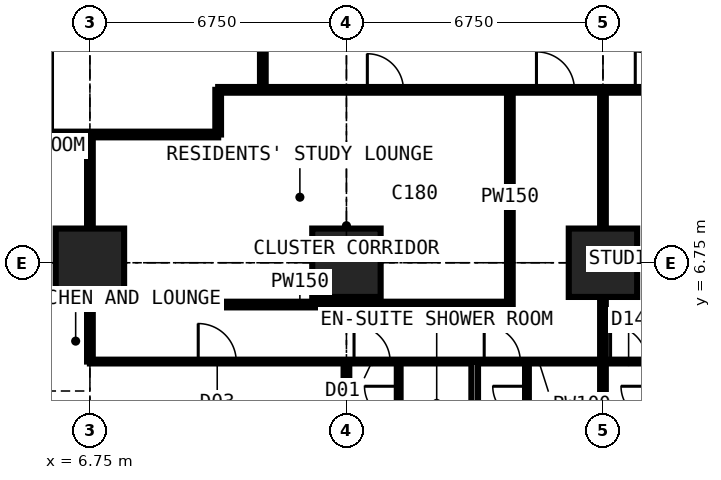
"""IFC4 building model, lengths in metres.
Left out: names, types, materials, properties, quantities, classifications, styles, units other than length and angle.
Written with IfcOpenShell. Run it as: python <this file> out.ifc"""

import sys

from ifc_helpers import new_model, si_unit, direction, frame, frame_2d, origin, origin_2d, place, context, subcontext, project, spatial, rectangle, extrude, element, fill, save


model = new_model("IFC4")
c1 = context("Model", 3, precision=1e-05, world=origin(), true_north=direction((0.0, 1.0)))
c2 = subcontext(c1, "Body", "Model", "MODEL_VIEW")
j1 = project(units=[si_unit("LENGTHUNIT", "METRE"), si_unit("PLANEANGLEUNIT", "RADIAN")], contexts=[c1])
p1 = place(None, origin())
s1 = spatial("IfcSite", under=j1, at=p1, CompositionType="ELEMENT")
p2 = place(p1, origin())
s2 = spatial("IfcBuilding", under=s1, at=p2, CompositionType="ELEMENT")
p3 = place(p2, frame((0.0, 0.0, 90.9)))
s3 = spatial("IfcBuildingStorey", under=s2, at=p3, CompositionType="ELEMENT", Elevation=90.9)
for number, where, z_axis, x_axis in (
    (1, (6.75, 6.75, 0.0), (0.0, 0.0, 1.0), (1.0, 0.0, 0.0)),
    (2, (13.5, 6.75, 0.0), (0.0, 0.0, 1.0), (1.0, 0.0, 0.0)),
    (3, (20.25, 6.75, 0.0), (0.0, 0.0, 1.0), (1.0, 0.0, 0.0)),
):
    element("IfcColumn", number, at=place(p3, frame(where, z_axis=z_axis, x_axis=x_axis)), inside=s3, PredefinedType="COLUMN", context=c2, shape_type="SweptSolid", body=[
        extrude(rectangle(XDim=1.8, YDim=1.8, at=origin_2d()), origin(), (0.0, 0.0, 1.0), 3.6),
    ])
p4 = place(p3, frame((-0.734, 10.125, 0.0), z_axis=(0.0, 0.0, 1.0), x_axis=(1.0, 0.0, 0.0)))
e4 = element("IfcWall", 4, at=p4, inside=s3, PredefinedType="PARTITIONING", context=c2, shape_type="SweptSolid", body=[
    extrude(rectangle(XDim=10.859, YDim=0.15, at=frame_2d((5.429, 0.0))), origin(), (0.0, 0.0, 1.0), 3.375),
])
p5 = place(p3, frame((6.75, 4.15, 0.0), z_axis=(0.0, 0.0, 1.0), x_axis=(0.0, 1.0, 0.0)))
e5 = element("IfcWall", 5, at=p5, inside=s3, PredefinedType="PARTITIONING", context=c2, shape_type="SweptSolid", body=[
    extrude(rectangle(XDim=5.975, YDim=0.15, at=frame_2d((2.988, 0.0))), origin(), (0.0, 0.0, 1.0), 2.877),
])
p6 = place(p3, frame((6.75, 4.15, 0.0), z_axis=(0.0, 0.0, 1.0), x_axis=(1.0, 0.0, 0.0)))
e6 = element("IfcWall", 6, at=p6, inside=s3, PredefinedType="PARTITIONING", context=c2, shape_type="SweptSolid", body=[
    extrude(rectangle(XDim=23.625, YDim=0.1, at=frame_2d((11.812, 0.0))), origin(), (0.0, 0.0, 1.0), 3.375),
])
p7 = place(p6, frame((2.85, 0.0, 0.0)))
e7 = element("IfcOpeningElement", 7, at=p7, cuts=e6, PredefinedType="OPENING", context=c2, shape_type="SweptSolid", body=[
    extrude(rectangle(XDim=1.0, YDim=2.2, at=frame_2d((0.5, 1.1))), frame((0.0, 0.06, 0.0), z_axis=(0.0, -1.0, 0.0), x_axis=(1.0, 0.0, 0.0)), (0.0, 0.0, 1.0), 0.12),
])
p8 = place(p6, frame((6.95, 0.0, 0.0)))
e8 = element("IfcOpeningElement", 8, at=p8, cuts=e6, PredefinedType="OPENING", context=c2, shape_type="SweptSolid", body=[
    extrude(rectangle(XDim=0.95, YDim=2.2, at=frame_2d((0.475, 1.1))), frame((0.0, 0.06, 0.0), z_axis=(0.0, -1.0, 0.0), x_axis=(1.0, 0.0, 0.0)), (0.0, 0.0, 1.0), 0.12),
])
p9 = place(p6, frame((10.375, 0.0, 0.0)))
e9 = element("IfcOpeningElement", 9, at=p9, cuts=e6, PredefinedType="OPENING", context=c2, shape_type="SweptSolid", body=[
    extrude(rectangle(XDim=0.95, YDim=2.2, at=frame_2d((0.475, 1.1))), frame((0.0, 0.06, 0.0), z_axis=(0.0, -1.0, 0.0), x_axis=(1.0, 0.0, 0.0)), (0.0, 0.0, 1.0), 0.12),
])
p10 = place(p6, frame((13.7, 0.0, 0.0)))
e10 = element("IfcOpeningElement", 10, at=p10, cuts=e6, PredefinedType="OPENING", context=c2, shape_type="SweptSolid", body=[
    extrude(rectangle(XDim=0.95, YDim=2.2, at=frame_2d((0.475, 1.1))), frame((0.0, 0.06, 0.0), z_axis=(0.0, -1.0, 0.0), x_axis=(1.0, 0.0, 0.0)), (0.0, 0.0, 1.0), 0.12),
])
p11 = place(p6, frame((17.125, 0.0, 0.0)))
e11 = element("IfcOpeningElement", 11, at=p11, cuts=e6, PredefinedType="OPENING", context=c2, shape_type="SweptSolid", body=[
    extrude(rectangle(XDim=0.95, YDim=2.2, at=frame_2d((0.475, 1.1))), frame((0.0, 0.06, 0.0), z_axis=(0.0, -1.0, 0.0), x_axis=(1.0, 0.0, 0.0)), (0.0, 0.0, 1.0), 0.12),
])
p12 = place(p6, frame((20.5, 0.0, 0.0)))
e12 = element("IfcOpeningElement", 12, at=p12, cuts=e6, PredefinedType="OPENING", context=c2, shape_type="SweptSolid", body=[
    extrude(rectangle(XDim=0.95, YDim=2.2, at=frame_2d((0.475, 1.1))), frame((0.0, 0.06, 0.0), z_axis=(0.0, -1.0, 0.0), x_axis=(1.0, 0.0, 0.0)), (0.0, 0.0, 1.0), 0.12),
])
p13 = place(p3, frame((6.75, 5.65, 0.0), z_axis=(0.0, 0.0, 1.0), x_axis=(1.0, 0.0, 0.0)))
e13 = element("IfcWall", 13, at=p13, inside=s3, PredefinedType="PARTITIONING", context=c2, shape_type="SweptSolid", body=[
    extrude(rectangle(XDim=11.05, YDim=0.15, at=frame_2d((5.525, 0.0))), origin(), (0.0, 0.0, 1.0), 3.375),
])
p14 = place(p3, frame((10.125, 10.125, 0.0), z_axis=(0.0, 0.0, 1.0), x_axis=(0.0, 1.0, 0.0)))
e14 = element("IfcWall", 14, at=p14, inside=s3, PredefinedType="PARTITIONING", context=c2, shape_type="SweptSolid", body=[
    extrude(rectangle(XDim=1.175, YDim=0.15, at=frame_2d((0.587, 0.0))), origin(), (0.0, 0.0, 1.0), 3.375),
])
p15 = place(p3, frame((10.125, 11.3, 0.0), z_axis=(0.0, 0.0, 1.0), x_axis=(1.0, 0.0, 0.0)))
e15 = element("IfcWall", 15, at=p15, inside=s3, PredefinedType="PARTITIONING", context=c2, shape_type="SweptSolid", body=[
    extrude(rectangle(XDim=20.675, YDim=0.15, at=frame_2d((10.337, 0.0))), origin(), (0.0, 0.0, 1.0), 3.375),
])
p16 = place(p15, frame((8.375, 0.0, 0.0)))
e16 = element("IfcOpeningElement", 16, at=p16, cuts=e15, PredefinedType="OPENING", context=c2, shape_type="SweptSolid", body=[
    extrude(rectangle(XDim=1.0, YDim=2.2, at=frame_2d((0.5, 1.1))), frame((0.0, 0.085, 0.0), z_axis=(0.0, -1.0, 0.0), x_axis=(1.0, 0.0, 0.0)), (0.0, 0.0, 1.0), 0.17),
])
p17 = place(p15, frame((10.975, 0.0, 0.0)))
e17 = element("IfcOpeningElement", 17, at=p17, cuts=e15, PredefinedType="OPENING", context=c2, shape_type="SweptSolid", body=[
    extrude(rectangle(XDim=1.0, YDim=2.2, at=frame_2d((0.5, 1.1))), frame((0.0, 0.085, 0.0), z_axis=(0.0, -1.0, 0.0), x_axis=(1.0, 0.0, 0.0)), (0.0, 0.0, 1.0), 0.17),
])
p18 = place(p15, frame((3.925, 0.0, 0.0)))
e18 = element("IfcOpeningElement", 18, at=p18, cuts=e15, PredefinedType="OPENING", context=c2, shape_type="SweptSolid", body=[
    extrude(rectangle(XDim=0.95, YDim=2.2, at=frame_2d((0.475, 1.1))), frame((0.0, 0.085, 0.0), z_axis=(0.0, -1.0, 0.0), x_axis=(1.0, 0.0, 0.0)), (0.0, 0.0, 1.0), 0.17),
])
p19 = place(p3, frame((11.3, 11.3, 0.0), z_axis=(0.0, 0.0, 1.0), x_axis=(0.0, 1.0, 0.0)))
e19 = element("IfcWall", 19, at=p19, inside=s3, PredefinedType="PARTITIONING", context=c2, shape_type="SweptSolid", body=[
    extrude(rectangle(XDim=19.3, YDim=0.15, at=frame_2d((9.65, 0.0))), origin(), (0.0, 0.0, 1.0), 3.375),
])
p20 = place(p19, frame((18.1, 0.0, 0.0)))
e20 = element("IfcOpeningElement", 20, at=p20, cuts=e19, PredefinedType="OPENING", context=c2, shape_type="SweptSolid", body=[
    extrude(rectangle(XDim=1.0, YDim=2.2, at=frame_2d((0.5, 1.1))), frame((0.0, 0.085, 0.0), z_axis=(0.0, -1.0, 0.0), x_axis=(1.0, 0.0, 0.0)), (0.0, 0.0, 1.0), 0.17),
])
p21 = place(p19, frame((10.137, 0.0, 0.0)))
e21 = element("IfcOpeningElement", 21, at=p21, cuts=e19, PredefinedType="OPENING", context=c2, shape_type="SweptSolid", body=[
    extrude(rectangle(XDim=1.0, YDim=2.2, at=frame_2d((0.5, 1.1))), frame((0.0, 0.085, 0.0), z_axis=(0.0, -1.0, 0.0), x_axis=(1.0, 0.0, 0.0)), (0.0, 0.0, 1.0), 0.17),
])
p22 = place(p3, frame((13.5, -0.734, 0.0), z_axis=(0.0, 0.0, 1.0), x_axis=(0.0, 1.0, 0.0)))
e22 = element("IfcWall", 22, at=p22, inside=s3, PredefinedType="PARTITIONING", context=c2, shape_type="SweptSolid", body=[
    extrude(rectangle(XDim=4.884, YDim=0.15, at=frame_2d((2.442, 0.0))), origin(), (0.0, 0.0, 1.0), 2.61),
])
p23 = place(p3, frame((14.875, 1.95, 0.0), z_axis=(0.0, 0.0, 1.0), x_axis=(0.0, 1.0, 0.0)))
e23 = element("IfcWall", 23, at=p23, inside=s3, PredefinedType="PARTITIONING", context=c2, shape_type="SweptSolid", body=[
    extrude(rectangle(XDim=2.2, YDim=0.1, at=frame_2d((1.1, 0.0))), origin(), (0.0, 0.0, 1.0), 3.375),
])
p24 = place(p23, frame((0.65, 0.0, 0.0)))
e24 = element("IfcOpeningElement", 24, at=p24, cuts=e23, PredefinedType="OPENING", context=c2, shape_type="SweptSolid", body=[
    extrude(rectangle(XDim=0.9, YDim=2.2, at=frame_2d((0.45, 1.1))), frame((0.0, 0.06, 0.0), z_axis=(0.0, -1.0, 0.0), x_axis=(1.0, 0.0, 0.0)), (0.0, 0.0, 1.0), 0.12),
])
p25 = place(p3, frame((16.875, -0.734, 0.0), z_axis=(0.0, 0.0, 1.0), x_axis=(0.0, 1.0, 0.0)))
e25 = element("IfcWall", 25, at=p25, inside=s3, PredefinedType="PARTITIONING", context=c2, shape_type="SweptSolid", body=[
    extrude(rectangle(XDim=4.884, YDim=0.175, at=frame_2d((2.442, 0.0))), origin(), (0.0, 0.0, 1.0), 3.375),
])
p26 = place(p3, frame((17.8, 5.65, 0.0), z_axis=(0.0, 0.0, 1.0), x_axis=(0.0, 1.0, 0.0)))
e26 = element("IfcWall", 26, at=p26, inside=s3, PredefinedType="PARTITIONING", context=c2, shape_type="SweptSolid", body=[
    extrude(rectangle(XDim=5.65, YDim=0.15, at=frame_2d((2.825, 0.0))), origin(), (0.0, 0.0, 1.0), 3.375),
])
p27 = place(p3, frame((18.25, 1.95, 0.0), z_axis=(0.0, 0.0, 1.0), x_axis=(0.0, 1.0, 0.0)))
e27 = element("IfcWall", 27, at=p27, inside=s3, PredefinedType="PARTITIONING", context=c2, shape_type="SweptSolid", body=[
    extrude(rectangle(XDim=2.2, YDim=0.1, at=frame_2d((1.1, 0.0))), origin(), (0.0, 0.0, 1.0), 3.375),
])
p28 = place(p27, frame((0.65, 0.0, 0.0)))
e28 = element("IfcOpeningElement", 28, at=p28, cuts=e27, PredefinedType="OPENING", context=c2, shape_type="SweptSolid", body=[
    extrude(rectangle(XDim=0.9, YDim=2.2, at=frame_2d((0.45, 1.1))), frame((0.0, 0.06, 0.0), z_axis=(0.0, -1.0, 0.0), x_axis=(1.0, 0.0, 0.0)), (0.0, 0.0, 1.0), 0.12),
])
p29 = place(p3, frame((20.25, -0.734, 0.0), z_axis=(0.0, 0.0, 1.0), x_axis=(0.0, 1.0, 0.0)))
e29 = element("IfcWall", 29, at=p29, inside=s3, PredefinedType="PARTITIONING", context=c2, shape_type="SweptSolid", body=[
    extrude(rectangle(XDim=12.034, YDim=0.15, at=frame_2d((6.017, 0.0))), origin(), (0.0, 0.0, 1.0), 2.61),
])
p30 = place(p7, origin())
e30 = element("IfcDoor", 30, at=p30, inside=s3, OperationType="SINGLE_SWING_LEFT", PredefinedType="DOOR", context=c2, shape_type="SweptSolid", body=[
    extrude(rectangle(XDim=1.0, YDim=2.2, at=frame_2d((0.5, 1.1))), frame((0.0, 0.025, 0.0), z_axis=(0.0, -1.0, 0.0), x_axis=(1.0, 0.0, 0.0)), (0.0, 0.0, 1.0), 0.05),
])
fill(e7, e30)
p31 = place(p8, origin())
e31 = element("IfcDoor", 31, at=p31, inside=s3, OperationType="SINGLE_SWING_LEFT", PredefinedType="DOOR", context=c2, shape_type="SweptSolid", body=[
    extrude(rectangle(XDim=0.95, YDim=2.2, at=frame_2d((0.475, 1.1))), frame((0.0, 0.025, 0.0), z_axis=(0.0, -1.0, 0.0), x_axis=(1.0, 0.0, 0.0)), (0.0, 0.0, 1.0), 0.05),
])
fill(e8, e31)
p32 = place(p24, origin())
e32 = element("IfcDoor", 32, at=p32, inside=s3, OperationType="SINGLE_SWING_RIGHT", PredefinedType="DOOR", context=c2, shape_type="SweptSolid", body=[
    extrude(rectangle(XDim=0.9, YDim=2.2, at=frame_2d((0.45, 1.1))), frame((0.0, 0.025, 0.0), z_axis=(0.0, -1.0, 0.0), x_axis=(1.0, 0.0, 0.0)), (0.0, 0.0, 1.0), 0.05),
])
fill(e24, e32)
p33 = place(p9, origin())
e33 = element("IfcDoor", 33, at=p33, inside=s3, OperationType="SINGLE_SWING_LEFT", PredefinedType="DOOR", context=c2, shape_type="SweptSolid", body=[
    extrude(rectangle(XDim=0.95, YDim=2.2, at=frame_2d((0.475, 1.1))), frame((0.0, 0.025, 0.0), z_axis=(0.0, -1.0, 0.0), x_axis=(1.0, 0.0, 0.0)), (0.0, 0.0, 1.0), 0.05),
])
fill(e9, e33)
p34 = place(p28, origin())
e34 = element("IfcDoor", 34, at=p34, inside=s3, OperationType="SINGLE_SWING_RIGHT", PredefinedType="DOOR", context=c2, shape_type="SweptSolid", body=[
    extrude(rectangle(XDim=0.9, YDim=2.2, at=frame_2d((0.45, 1.1))), frame((0.0, 0.025, 0.0), z_axis=(0.0, -1.0, 0.0), x_axis=(1.0, 0.0, 0.0)), (0.0, 0.0, 1.0), 0.05),
])
fill(e28, e34)
p35 = place(p16, origin())
e35 = element("IfcDoor", 35, at=p35, inside=s3, OperationType="SINGLE_SWING_LEFT", PredefinedType="DOOR", context=c2, shape_type="SweptSolid", body=[
    extrude(rectangle(XDim=1.0, YDim=2.2, at=frame_2d((0.5, 1.1))), frame((0.0, 0.025, 0.0), z_axis=(0.0, -1.0, 0.0), x_axis=(1.0, 0.0, 0.0)), (0.0, 0.0, 1.0), 0.05),
])
fill(e16, e35)
p36 = place(p10, origin())
e36 = element("IfcDoor", 36, at=p36, inside=s3, OperationType="SINGLE_SWING_LEFT", PredefinedType="DOOR", context=c2, shape_type="SweptSolid", body=[
    extrude(rectangle(XDim=0.95, YDim=2.2, at=frame_2d((0.475, 1.1))), frame((0.0, 0.025, 0.0), z_axis=(0.0, -1.0, 0.0), x_axis=(1.0, 0.0, 0.0)), (0.0, 0.0, 1.0), 0.05),
])
fill(e10, e36)
p37 = place(p17, origin())
e37 = element("IfcDoor", 37, at=p37, inside=s3, OperationType="SINGLE_SWING_LEFT", PredefinedType="DOOR", context=c2, shape_type="SweptSolid", body=[
    extrude(rectangle(XDim=1.0, YDim=2.2, at=frame_2d((0.5, 1.1))), frame((0.0, 0.025, 0.0), z_axis=(0.0, -1.0, 0.0), x_axis=(1.0, 0.0, 0.0)), (0.0, 0.0, 1.0), 0.05),
])
fill(e17, e37)
p38 = place(p18, origin())
e38 = element("IfcDoor", 38, at=p38, inside=s3, OperationType="SINGLE_SWING_LEFT", PredefinedType="DOOR", context=c2, shape_type="SweptSolid", body=[
    extrude(rectangle(XDim=0.95, YDim=2.2, at=frame_2d((0.475, 1.1))), frame((0.0, 0.025, 0.0), z_axis=(0.0, -1.0, 0.0), x_axis=(1.0, 0.0, 0.0)), (0.0, 0.0, 1.0), 0.05),
])
fill(e18, e38)
save(model, sys.argv[1])
